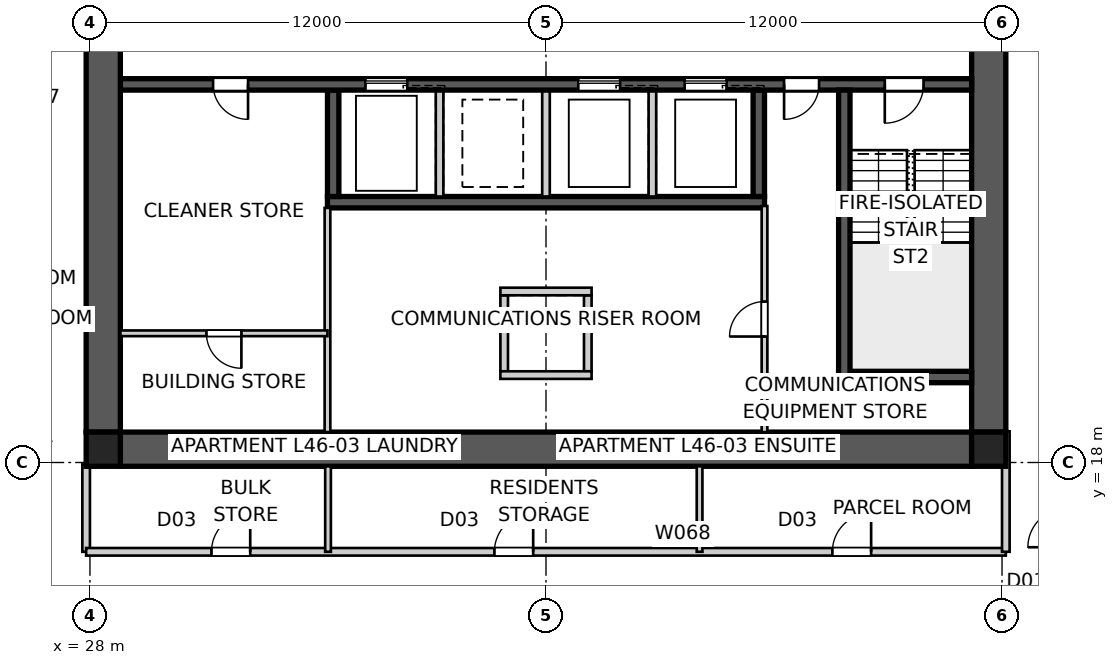
"""IFC4 building model, lengths in metres.
Left out: names, types, materials, properties, quantities, classifications, styles, units other than length and angle.
Written with IfcOpenShell. Run it as: python <this file> out.ifc"""

import sys

from ifc_helpers import new_model, si_unit, direction, frame, frame_2d, origin, origin_2d, place, context, subcontext, project, spatial, polyline, rectangle, outline, extrude, element, fill, save


model = new_model("IFC4")
c1 = context("Model", 3, precision=1e-05, world=origin(), true_north=direction((0.0, 1.0)))
c2 = subcontext(c1, "Body", "Model", "MODEL_VIEW")
j1 = project(units=[si_unit("LENGTHUNIT", "METRE"), si_unit("PLANEANGLEUNIT", "RADIAN")], contexts=[c1])
p1 = place(None, origin())
s1 = spatial("IfcSite", under=j1, at=p1, CompositionType="ELEMENT")
p2 = place(p1, origin())
s2 = spatial("IfcBuilding", under=s1, at=p2, CompositionType="ELEMENT")
p3 = place(p2, frame((0.0, 0.0, 167.6)))
s3 = spatial("IfcBuildingStorey", under=s2, at=p3, CompositionType="ELEMENT", Elevation=167.6)
p4 = place(p3, frame((51.2, 18.35, 0.0), z_axis=(0.0, 0.0, 1.0), x_axis=(-1.0, 0.0, 0.0)))
e1 = element("IfcWall", 1, at=p4, inside=s3, PredefinedType="SHEAR", context=c2, shape_type="SweptSolid", body=[
    extrude(outline(polyline([(0.0, -0.45), (22.4, -0.45), (22.4, -0.025), (22.85, -0.025), (22.85, 0.025), (22.4, 0.025), (22.4, 0.45), (0.0, 0.45), (0.0, 0.025), (-0.45, 0.025), (-0.45, -0.025), (0.0, -0.025), (0.0, -0.45)])), origin(), (0.0, 0.0, 1.0), 3.4),
])
p5 = place(p3, frame((51.65, 18.8, 0.0), z_axis=(0.0, 0.0, 1.0), x_axis=(0.0, 1.0, 0.0)))
e2 = element("IfcWall", 2, at=p5, inside=s3, PredefinedType="SHEAR", context=c2, shape_type="SweptSolid", body=[
    extrude(outline(polyline([(0.0, -0.45), (22.4, -0.45), (22.4, -0.025), (22.85, -0.025), (22.85, 0.025), (22.4, 0.025), (22.4, 0.45), (0.0, 0.45), (0.0, 0.025), (-0.45, 0.025), (-0.45, -0.025), (0.0, -0.025), (0.0, -0.45)])), origin(), (0.0, 0.0, 1.0), 3.4),
])
p6 = place(p5, frame((11.14, 0.0, 0.0)))
e3 = element("IfcOpeningElement", 3, at=p6, cuts=e2, PredefinedType="OPENING", context=c2, shape_type="SweptSolid", body=[
    extrude(rectangle(XDim=1.02, YDim=2.4, at=frame_2d((0.51, 1.2))), frame((0.0, 0.46, 0.0), z_axis=(0.0, -1.0, 0.0), x_axis=(1.0, 0.0, 0.0)), (0.0, 0.0, 1.0), 0.92),
])
p7 = place(p3, frame((28.35, 41.2, 0.0), z_axis=(0.0, 0.0, 1.0), x_axis=(0.0, -1.0, 0.0)))
e4 = element("IfcWall", 4, at=p7, inside=s3, PredefinedType="SHEAR", context=c2, shape_type="SweptSolid", body=[
    extrude(outline(polyline([(0.0, -0.45), (22.4, -0.45), (22.4, -0.025), (22.85, -0.025), (22.85, 0.025), (22.4, 0.025), (22.4, 0.45), (0.0, 0.45), (0.0, 0.025), (-0.45, 0.025), (-0.45, -0.025), (0.0, -0.025), (0.0, -0.45)])), origin(), (0.0, 0.0, 1.0), 3.4),
])
p8 = place(p7, frame((11.14, 0.0, 0.0)))
e5 = element("IfcOpeningElement", 5, at=p8, cuts=e4, PredefinedType="OPENING", context=c2, shape_type="SweptSolid", body=[
    extrude(rectangle(XDim=1.02, YDim=2.4, at=frame_2d((0.51, 1.2))), frame((0.0, 0.46, 0.0), z_axis=(0.0, -1.0, 0.0), x_axis=(1.0, 0.0, 0.0)), (0.0, 0.0, 1.0), 0.92),
])
p9 = place(p3, frame((51.2, 27.95, 0.0), z_axis=(0.0, 0.0, 1.0), x_axis=(-1.0, 0.0, 0.0)))
e6 = element("IfcWall", 6, at=p9, inside=s3, PredefinedType="SHEAR", context=c2, shape_type="SweptSolid", body=[
    extrude(rectangle(XDim=22.4, YDim=0.3, at=frame_2d((11.2, 0.0))), origin(), (0.0, 0.0, 1.0), 3.4),
])
p10 = place(p9, frame((19.04, 0.0, 0.0)))
e7 = element("IfcOpeningElement", 7, at=p10, cuts=e6, PredefinedType="OPENING", context=c2, shape_type="SweptSolid", body=[
    extrude(rectangle(XDim=0.92, YDim=2.1, at=frame_2d((0.46, 1.05))), frame((0.0, 0.16, 0.0), z_axis=(0.0, -1.0, 0.0), x_axis=(1.0, 0.0, 0.0)), (0.0, 0.0, 1.0), 0.32),
])
p11 = place(p9, frame((1.265, 0.0, 0.0)))
e8 = element("IfcOpeningElement", 8, at=p11, cuts=e6, PredefinedType="OPENING", context=c2, shape_type="SweptSolid", body=[
    extrude(rectangle(XDim=1.02, YDim=2.1, at=frame_2d((0.51, 1.05))), frame((0.0, 0.16, 0.0), z_axis=(0.0, -1.0, 0.0), x_axis=(1.0, 0.0, 0.0)), (0.0, 0.0, 1.0), 0.32),
])
p12 = place(p9, frame((4.015, 0.0, 0.0)))
e9 = element("IfcOpeningElement", 9, at=p12, cuts=e6, PredefinedType="OPENING", context=c2, shape_type="SweptSolid", body=[
    extrude(rectangle(XDim=0.92, YDim=2.1, at=frame_2d((0.46, 1.05))), frame((0.0, 0.16, 0.0), z_axis=(0.0, -1.0, 0.0), x_axis=(1.0, 0.0, 0.0)), (0.0, 0.0, 1.0), 0.32),
])
p13 = place(p9, frame((6.45, 0.0, 0.0)))
e10 = element("IfcOpeningElement", 10, at=p13, cuts=e6, PredefinedType="OPENING", context=c2, shape_type="SweptSolid", body=[
    extrude(rectangle(XDim=1.1, YDim=2.1, at=frame_2d((0.55, 1.05))), frame((0.0, 0.16, 0.0), z_axis=(0.0, -1.0, 0.0), x_axis=(1.0, 0.0, 0.0)), (0.0, 0.0, 1.0), 0.32),
])
p14 = place(p9, frame((9.25, 0.0, 0.0)))
e11 = element("IfcOpeningElement", 11, at=p14, cuts=e6, PredefinedType="OPENING", context=c2, shape_type="SweptSolid", body=[
    extrude(rectangle(XDim=1.1, YDim=2.1, at=frame_2d((0.55, 1.05))), frame((0.0, 0.16, 0.0), z_axis=(0.0, -1.0, 0.0), x_axis=(1.0, 0.0, 0.0)), (0.0, 0.0, 1.0), 0.32),
])
p15 = place(p9, frame((14.85, 0.0, 0.0)))
e12 = element("IfcOpeningElement", 12, at=p15, cuts=e6, PredefinedType="OPENING", context=c2, shape_type="SweptSolid", body=[
    extrude(rectangle(XDim=1.1, YDim=2.1, at=frame_2d((0.55, 1.05))), frame((0.0, 0.16, 0.0), z_axis=(0.0, -1.0, 0.0), x_axis=(1.0, 0.0, 0.0)), (0.0, 0.0, 1.0), 0.32),
])
p16 = place(p3, frame((45.75, 24.85, 0.0), z_axis=(0.0, 0.0, 1.0), x_axis=(-1.0, 0.0, 0.0)))
e13 = element("IfcWall", 13, at=p16, inside=s3, PredefinedType="SHEAR", context=c2, shape_type="SweptSolid", body=[
    extrude(rectangle(XDim=11.5, YDim=0.3, at=frame_2d((5.75, 0.0))), origin(), (0.0, 0.0, 1.0), 3.4),
])
p17 = place(p3, frame((45.6, 27.8, 0.0), z_axis=(0.0, 0.0, 1.0), x_axis=(0.0, -1.0, 0.0)))
e14 = element("IfcWall", 14, at=p17, inside=s3, PredefinedType="SHEAR", context=c2, shape_type="SweptSolid", body=[
    extrude(rectangle(XDim=2.8, YDim=0.3, at=frame_2d((1.4, 0.0))), origin(), (0.0, 0.0, 1.0), 3.4),
])
for number, where, z_axis, x_axis in (
    (15, (42.8, 27.8, 0.0), (0.0, 0.0, 1.0), (0.0, -1.0, 0.0)),
    (16, (40.0, 27.8, 0.0), (0.0, 0.0, 1.0), (0.0, -1.0, 0.0)),
    (17, (37.2, 27.8, 0.0), (0.0, 0.0, 1.0), (0.0, -1.0, 0.0)),
):
    element("IfcWall", number, at=place(p3, frame(where, z_axis=z_axis, x_axis=x_axis)), inside=s3, PredefinedType="SOLIDWALL", context=c2, shape_type="SweptSolid", body=[
        extrude(rectangle(XDim=2.8, YDim=0.2, at=frame_2d((1.4, 0.0))), origin(), (0.0, 0.0, 1.0), 3.4),
    ])
p18 = place(p3, frame((34.4, 27.8, 0.0), z_axis=(0.0, 0.0, 1.0), x_axis=(0.0, -1.0, 0.0)))
e18 = element("IfcWall", 18, at=p18, inside=s3, PredefinedType="SHEAR", context=c2, shape_type="SweptSolid", body=[
    extrude(rectangle(XDim=2.8, YDim=0.3, at=frame_2d((1.4, 0.0))), origin(), (0.0, 0.0, 1.0), 3.4),
])
p19 = place(p3, frame((47.85, 27.8, 0.0), z_axis=(0.0, 0.0, 1.0), x_axis=(0.0, -1.0, 0.0)))
e19 = element("IfcWall", 19, at=p19, inside=s3, PredefinedType="SHEAR", context=c2, shape_type="SweptSolid", body=[
    extrude(rectangle(XDim=7.7, YDim=0.3, at=frame_2d((3.85, 0.0))), origin(), (0.0, 0.0, 1.0), 3.4),
])
p20 = place(p3, frame((51.2, 20.25, 0.0), z_axis=(0.0, 0.0, 1.0), x_axis=(-1.0, 0.0, 0.0)))
e20 = element("IfcWall", 20, at=p20, inside=s3, PredefinedType="SHEAR", context=c2, shape_type="SweptSolid", body=[
    extrude(rectangle(XDim=3.5, YDim=0.3, at=frame_2d((1.75, 0.0))), origin(), (0.0, 0.0, 1.0), 3.4),
])
for number, where, z_axis, x_axis in (
    (21, (38.9, 22.4, 0.0), (0.0, 0.0, 1.0), (0.0, -1.0, 0.0)),
    (22, (41.1, 22.4, 0.0), (0.0, 0.0, 1.0), (0.0, -1.0, 0.0)),
):
    element("IfcWall", number, at=place(p3, frame(where, z_axis=z_axis, x_axis=x_axis)), inside=s3, PredefinedType="SOLIDWALL", context=c2, shape_type="SweptSolid", body=[
        extrude(rectangle(XDim=2.0, YDim=0.2, at=frame_2d((1.0, 0.0))), origin(), (0.0, 0.0, 1.0), 3.4),
    ])
for number, where, z_axis, x_axis in (
    (23, (38.8, 22.5, 0.0), (0.0, 0.0, 1.0), (1.0, 0.0, 0.0)),
    (24, (38.8, 20.3, 0.0), (0.0, 0.0, 1.0), (1.0, 0.0, 0.0)),
):
    element("IfcWall", number, at=place(p3, frame(where, z_axis=z_axis, x_axis=x_axis)), inside=s3, PredefinedType="SOLIDWALL", context=c2, shape_type="SweptSolid", body=[
        extrude(rectangle(XDim=2.4, YDim=0.2, at=frame_2d((1.2, 0.0))), origin(), (0.0, 0.0, 1.0), 3.4),
    ])
for number, where, z_axis, x_axis in (
    (25, (28.35, 18.35, 0.0), (0.0, 0.0, 1.0), (1.0, 0.0, 0.0)),
    (26, (51.65, 18.35, 0.0), (0.0, 0.0, 1.0), (1.0, 0.0, 0.0)),
):
    element("IfcColumn", number, at=place(p3, frame(where, z_axis=z_axis, x_axis=x_axis)), inside=s3, PredefinedType="COLUMN", context=c2, shape_type="SweptSolid", body=[
        extrude(rectangle(XDim=0.9, YDim=0.9, at=origin_2d()), origin(), (0.0, 0.0, 1.0), 3.4),
    ])
p21 = place(p3, frame((45.75, 18.8, 0.0), z_axis=(0.0, 0.0, 1.0), x_axis=(0.0, 1.0, 0.0)))
e27 = element("IfcWall", 27, at=p21, inside=s3, PredefinedType="SOLIDWALL", context=c2, shape_type="SweptSolid", body=[
    extrude(rectangle(XDim=5.95, YDim=0.15, at=frame_2d((2.975, 0.0))), origin(), (0.0, 0.0, 1.0), 3.2),
])
p22 = place(p21, frame((2.515, 0.0, 0.0)))
e28 = element("IfcOpeningElement", 28, at=p22, cuts=e27, PredefinedType="OPENING", context=c2, shape_type="SweptSolid", body=[
    extrude(rectangle(XDim=0.92, YDim=2.1, at=frame_2d((0.46, 1.05))), frame((0.0, 0.085, 0.0), z_axis=(0.0, -1.0, 0.0), x_axis=(1.0, 0.0, 0.0)), (0.0, 0.0, 1.0), 0.17),
])
p23 = place(p3, frame((34.25, 18.8, 0.0), z_axis=(0.0, 0.0, 1.0), x_axis=(0.0, 1.0, 0.0)))
e29 = element("IfcWall", 29, at=p23, inside=s3, PredefinedType="SOLIDWALL", context=c2, shape_type="SweptSolid", body=[
    extrude(rectangle(XDim=5.9, YDim=0.15, at=frame_2d((2.95, 0.0))), origin(), (0.0, 0.0, 1.0), 3.2),
])
p24 = place(p3, frame((34.25, 21.4, 0.0), z_axis=(0.0, 0.0, 1.0), x_axis=(-1.0, 0.0, 0.0)))
e30 = element("IfcWall", 30, at=p24, inside=s3, PredefinedType="SOLIDWALL", context=c2, shape_type="SweptSolid", body=[
    extrude(rectangle(XDim=5.45, YDim=0.15, at=frame_2d((2.725, 0.0))), origin(), (0.0, 0.0, 1.0), 3.2),
])
p25 = place(p24, frame((2.265, 0.0, 0.0)))
e31 = element("IfcOpeningElement", 31, at=p25, cuts=e30, PredefinedType="OPENING", context=c2, shape_type="SweptSolid", body=[
    extrude(rectangle(XDim=0.92, YDim=2.1, at=frame_2d((0.46, 1.05))), frame((0.0, 0.085, 0.0), z_axis=(0.0, -1.0, 0.0), x_axis=(1.0, 0.0, 0.0)), (0.0, 0.0, 1.0), 0.17),
])
p26 = place(p3, frame((27.9, 17.95, 0.0), z_axis=(0.0, 0.0, 1.0), x_axis=(0.0, -1.0, 0.0)))
e32 = element("IfcWall", 32, at=p26, inside=s3, PredefinedType="PARTITIONING", context=c2, shape_type="SweptSolid", body=[
    extrude(rectangle(XDim=2.3, YDim=0.2, at=frame_2d((1.15, 0.0))), origin(), (0.0, 0.0, 1.0), 3.2),
])
p27 = place(p3, frame((27.9, 15.65, 0.0), z_axis=(0.0, 0.0, 1.0), x_axis=(1.0, 0.0, 0.0)))
e33 = element("IfcWall", 33, at=p27, inside=s3, PredefinedType="PARTITIONING", context=c2, shape_type="SweptSolid", body=[
    extrude(rectangle(XDim=24.2, YDim=0.2, at=frame_2d((12.1, 0.0))), origin(), (0.0, 0.0, 1.0), 3.2),
])
p28 = place(p27, frame((10.743, 0.0, 0.0)))
e34 = element("IfcOpeningElement", 34, at=p28, cuts=e33, PredefinedType="OPENING", context=c2, shape_type="SweptSolid", body=[
    extrude(rectangle(XDim=1.02, YDim=2.1, at=frame_2d((0.51, 1.05))), frame((0.0, 0.11, 0.0), z_axis=(0.0, -1.0, 0.0), x_axis=(1.0, 0.0, 0.0)), (0.0, 0.0, 1.0), 0.22),
])
p29 = place(p27, frame((19.636, 0.0, 0.0)))
e35 = element("IfcOpeningElement", 35, at=p29, cuts=e33, PredefinedType="OPENING", context=c2, shape_type="SweptSolid", body=[
    extrude(rectangle(XDim=1.02, YDim=2.1, at=frame_2d((0.51, 1.05))), frame((0.0, 0.11, 0.0), z_axis=(0.0, -1.0, 0.0), x_axis=(1.0, 0.0, 0.0)), (0.0, 0.0, 1.0), 0.22),
])
p30 = place(p27, frame((3.297, 0.0, 0.0)))
e36 = element("IfcOpeningElement", 36, at=p30, cuts=e33, PredefinedType="OPENING", context=c2, shape_type="SweptSolid", body=[
    extrude(rectangle(XDim=1.02, YDim=2.1, at=frame_2d((0.51, 1.05))), frame((0.0, 0.11, 0.0), z_axis=(0.0, -1.0, 0.0), x_axis=(1.0, 0.0, 0.0)), (0.0, 0.0, 1.0), 0.22),
])
p31 = place(p3, frame((52.1, 15.65, 0.0), z_axis=(0.0, 0.0, 1.0), x_axis=(0.0, 1.0, 0.0)))
e37 = element("IfcWall", 37, at=p31, inside=s3, PredefinedType="PARTITIONING", context=c2, shape_type="SweptSolid", body=[
    extrude(rectangle(XDim=3.17, YDim=0.2, at=frame_2d((1.585, 0.0))), origin(), (0.0, 0.0, 1.0), 3.2),
])
p32 = place(p3, frame((34.265, 15.65, 0.0), z_axis=(0.0, 0.0, 1.0), x_axis=(0.0, 1.0, 0.0)))
e38 = element("IfcWall", 38, at=p32, inside=s3, PredefinedType="SOLIDWALL", context=c2, shape_type="SweptSolid", body=[
    extrude(rectangle(XDim=2.25, YDim=0.15, at=frame_2d((1.125, 0.0))), origin(), (0.0, 0.0, 1.0), 2.672),
])
p33 = place(p3, frame((44.042, 15.65, 0.0), z_axis=(0.0, 0.0, 1.0), x_axis=(0.0, 1.0, 0.0)))
e39 = element("IfcWall", 39, at=p33, inside=s3, PredefinedType="SOLIDWALL", context=c2, shape_type="SweptSolid", body=[
    extrude(rectangle(XDim=2.25, YDim=0.15, at=frame_2d((1.125, 0.0))), origin(), (0.0, 0.0, 1.0), 3.2),
])
p34 = place(p10, origin())
e40 = element("IfcDoor", 40, at=p34, inside=s3, OperationType="SINGLE_SWING_LEFT", PredefinedType="DOOR", context=c2, shape_type="SweptSolid", body=[
    extrude(rectangle(XDim=0.92, YDim=2.1, at=frame_2d((0.46, 1.05))), frame((0.0, 0.025, 0.0), z_axis=(0.0, -1.0, 0.0), x_axis=(1.0, 0.0, 0.0)), (0.0, 0.0, 1.0), 0.05),
])
fill(e7, e40)
p35 = place(p11, origin())
e41 = element("IfcDoor", 41, at=p35, inside=s3, OperationType="SINGLE_SWING_RIGHT", PredefinedType="DOOR", context=c2, shape_type="SweptSolid", body=[
    extrude(rectangle(XDim=1.02, YDim=2.1, at=frame_2d((0.51, 1.05))), frame((0.0, 0.025, 0.0), z_axis=(0.0, -1.0, 0.0), x_axis=(1.0, 0.0, 0.0)), (0.0, 0.0, 1.0), 0.05),
])
fill(e8, e41)
p36 = place(p12, origin())
e42 = element("IfcDoor", 42, at=p36, inside=s3, OperationType="SINGLE_SWING_RIGHT", PredefinedType="DOOR", context=c2, shape_type="SweptSolid", body=[
    extrude(rectangle(XDim=0.92, YDim=2.1, at=frame_2d((0.46, 1.05))), frame((0.0, 0.025, 0.0), z_axis=(0.0, -1.0, 0.0), x_axis=(1.0, 0.0, 0.0)), (0.0, 0.0, 1.0), 0.05),
])
fill(e9, e42)
p37 = place(p28, origin())
e43 = element("IfcDoor", 43, at=p37, inside=s3, OperationType="SINGLE_SWING_RIGHT", PredefinedType="DOOR", context=c2, shape_type="SweptSolid", body=[
    extrude(rectangle(XDim=1.02, YDim=2.1, at=frame_2d((0.51, 1.05))), frame((0.0, 0.025, 0.0), z_axis=(0.0, -1.0, 0.0), x_axis=(1.0, 0.0, 0.0)), (0.0, 0.0, 1.0), 0.05),
])
fill(e34, e43)
p38 = place(p29, origin())
e44 = element("IfcDoor", 44, at=p38, inside=s3, OperationType="SINGLE_SWING_RIGHT", PredefinedType="DOOR", context=c2, shape_type="SweptSolid", body=[
    extrude(rectangle(XDim=1.02, YDim=2.1, at=frame_2d((0.51, 1.05))), frame((0.0, 0.025, 0.0), z_axis=(0.0, -1.0, 0.0), x_axis=(1.0, 0.0, 0.0)), (0.0, 0.0, 1.0), 0.05),
])
fill(e35, e44)
p39 = place(p30, origin())
e45 = element("IfcDoor", 45, at=p39, inside=s3, OperationType="SINGLE_SWING_RIGHT", PredefinedType="DOOR", context=c2, shape_type="SweptSolid", body=[
    extrude(rectangle(XDim=1.02, YDim=2.1, at=frame_2d((0.51, 1.05))), frame((0.0, 0.025, 0.0), z_axis=(0.0, -1.0, 0.0), x_axis=(1.0, 0.0, 0.0)), (0.0, 0.0, 1.0), 0.05),
])
fill(e36, e45)
p40 = place(p25, origin())
e46 = element("IfcDoor", 46, at=p40, inside=s3, OperationType="SINGLE_SWING_LEFT", PredefinedType="DOOR", context=c2, shape_type="SweptSolid", body=[
    extrude(rectangle(XDim=0.92, YDim=2.1, at=frame_2d((0.46, 1.05))), frame((0.0, 0.025, 0.0), z_axis=(0.0, -1.0, 0.0), x_axis=(1.0, 0.0, 0.0)), (0.0, 0.0, 1.0), 0.05),
])
fill(e31, e46)
p41 = place(p22, origin())
e47 = element("IfcDoor", 47, at=p41, inside=s3, OperationType="SINGLE_SWING_LEFT", PredefinedType="DOOR", context=c2, shape_type="SweptSolid", body=[
    extrude(rectangle(XDim=0.92, YDim=2.1, at=frame_2d((0.46, 1.05))), frame((0.0, 0.025, 0.0), z_axis=(0.0, -1.0, 0.0), x_axis=(1.0, 0.0, 0.0)), (0.0, 0.0, 1.0), 0.05),
])
fill(e28, e47)
p42 = place(p13, origin())
e48 = element("IfcDoor", 48, at=p42, inside=s3, OperationType="SLIDING_TO_LEFT", PredefinedType="DOOR", context=c2, shape_type="SweptSolid", body=[
    extrude(rectangle(XDim=1.1, YDim=2.1, at=frame_2d((0.55, 1.05))), frame((0.0, 0.025, 0.0), z_axis=(0.0, -1.0, 0.0), x_axis=(1.0, 0.0, 0.0)), (0.0, 0.0, 1.0), 0.05),
])
fill(e10, e48)
p43 = place(p14, origin())
e49 = element("IfcDoor", 49, at=p43, inside=s3, OperationType="SLIDING_TO_LEFT", PredefinedType="DOOR", context=c2, shape_type="SweptSolid", body=[
    extrude(rectangle(XDim=1.1, YDim=2.1, at=frame_2d((0.55, 1.05))), frame((0.0, 0.025, 0.0), z_axis=(0.0, -1.0, 0.0), x_axis=(1.0, 0.0, 0.0)), (0.0, 0.0, 1.0), 0.05),
])
fill(e11, e49)
p44 = place(p15, origin())
e50 = element("IfcDoor", 50, at=p44, inside=s3, OperationType="SLIDING_TO_LEFT", PredefinedType="DOOR", context=c2, shape_type="SweptSolid", body=[
    extrude(rectangle(XDim=1.1, YDim=2.1, at=frame_2d((0.55, 1.05))), frame((0.0, 0.025, 0.0), z_axis=(0.0, -1.0, 0.0), x_axis=(1.0, 0.0, 0.0)), (0.0, 0.0, 1.0), 0.05),
])
fill(e12, e50)
save(model, sys.argv[1])
